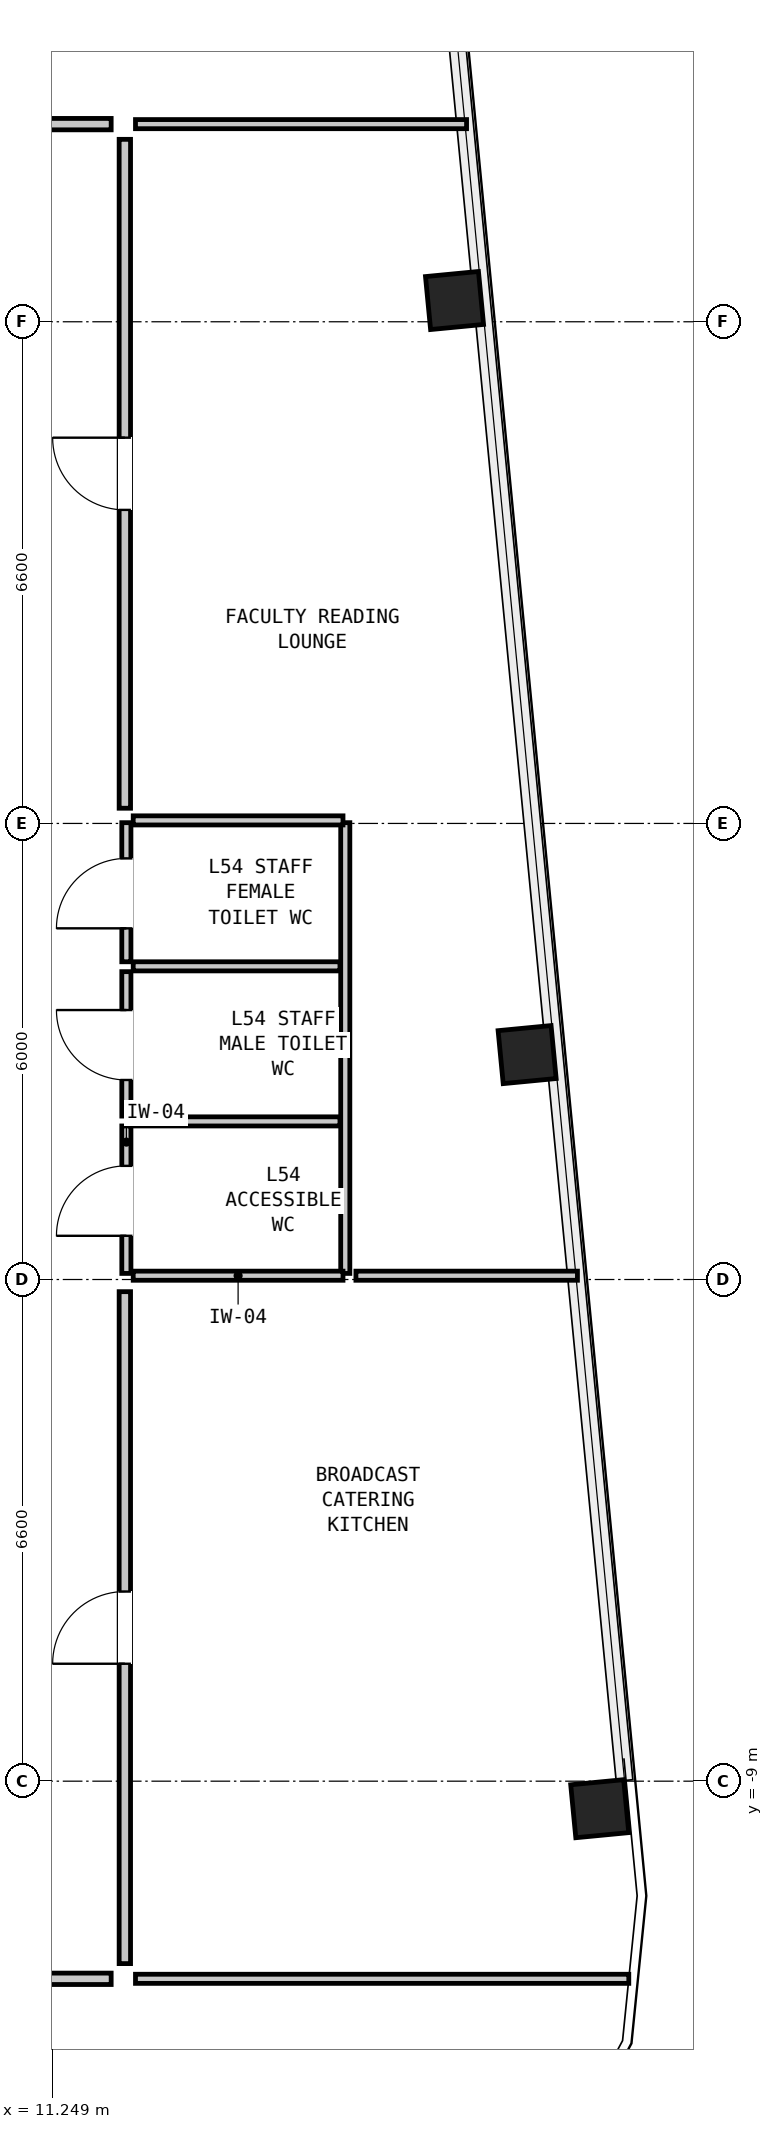
"""IFC4 building model, lengths in metres.
Left out: names, types, materials, properties, quantities, classifications, styles, units other than length and angle.
Written with IfcOpenShell. Run it as: python <this file> out.ifc"""

import sys

from ifc_helpers import new_model, si_unit, direction, frame, frame_2d, origin, origin_2d, place, context, subcontext, project, spatial, rectangle, hollow_rectangle, extrude, element, fill, save


model = new_model("IFC4")
c1 = context("Model", 3, precision=1e-05, world=origin(), true_north=direction((0.0, 1.0)))
c2 = subcontext(c1, "Body", "Model", "MODEL_VIEW")
j1 = project(units=[si_unit("LENGTHUNIT", "METRE"), si_unit("PLANEANGLEUNIT", "RADIAN")], contexts=[c1])
p1 = place(None, origin())
s1 = spatial("IfcSite", under=j1, at=p1, CompositionType="ELEMENT")
p2 = place(p1, origin())
s2 = spatial("IfcBuilding", under=s1, at=p2, CompositionType="ELEMENT")
p3 = place(p2, frame((0.0, 0.0, 183.6)))
s3 = spatial("IfcBuildingStorey", under=s2, at=p3, CompositionType="ELEMENT", Elevation=183.6)
for number, where, z_axis, x_axis in (
    (1, (18.448, -9.362, 0.0), (0.0, 0.0, 1.0), (-0.096, 0.995, 0.0)),
    (2, (17.493, 0.559, 0.0), (0.0, 0.0, 1.0), (-0.096, 0.995, 0.0)),
    (3, (16.537, 10.479, 0.0), (0.0, 0.0, 1.0), (-0.096, 0.995, 0.0)),
):
    element("IfcColumn", number, at=place(p3, frame(where, z_axis=z_axis, x_axis=x_axis)), inside=s3, PredefinedType="COLUMN", context=c2, shape_type="SweptSolid", body=[
        extrude(hollow_rectangle(XDim=0.7, YDim=0.7, WallThickness=0.045, at=origin_2d()), origin(), (0.0, 0.0, 1.0), 4.35),
    ])
p4 = place(p3, frame((12.22, -2.32, 0.0), z_axis=(0.0, 0.0, 1.0), x_axis=(0.0, 1.0, 0.0)))
e4 = element("IfcWall", 4, at=p4, inside=s3, PredefinedType="PARTITIONING", context=c2, shape_type="SweptSolid", body=[
    extrude(rectangle(XDim=1.94, YDim=0.12, at=frame_2d((0.97, 0.0))), origin(), (0.0, 0.0, 1.0), 4.07),
])
p5 = place(p4, frame((0.495, 0.0, 0.0)))
e5 = element("IfcOpeningElement", 5, at=p5, cuts=e4, PredefinedType="OPENING", context=c2, shape_type="SweptSolid", body=[
    extrude(rectangle(XDim=0.92, YDim=2.1, at=frame_2d((0.46, 1.05))), frame((0.0, 0.072, 0.0), z_axis=(0.0, -1.0, 0.0), x_axis=(1.0, 0.0, 0.0)), (0.0, 0.0, 1.0), 0.144),
])
p6 = place(p3, frame((12.22, -0.25, 0.0), z_axis=(0.0, 0.0, 1.0), x_axis=(0.0, 1.0, 0.0)))
e6 = element("IfcWall", 6, at=p6, inside=s3, PredefinedType="PARTITIONING", context=c2, shape_type="SweptSolid", body=[
    extrude(rectangle(XDim=1.9, YDim=0.12, at=frame_2d((0.95, 0.0))), origin(), (0.0, 0.0, 1.0), 4.07),
])
p7 = place(p6, frame((0.475, 0.0, 0.0)))
e7 = element("IfcOpeningElement", 7, at=p7, cuts=e6, PredefinedType="OPENING", context=c2, shape_type="SweptSolid", body=[
    extrude(rectangle(XDim=0.92, YDim=2.1, at=frame_2d((0.46, 1.05))), frame((0.0, 0.072, 0.0), z_axis=(0.0, -1.0, 0.0), x_axis=(1.0, 0.0, 0.0)), (0.0, 0.0, 1.0), 0.144),
])
p8 = place(p3, frame((12.22, 1.78, 0.0), z_axis=(0.0, 0.0, 1.0), x_axis=(0.0, 1.0, 0.0)))
e8 = element("IfcWall", 8, at=p8, inside=s3, PredefinedType="PARTITIONING", context=c2, shape_type="SweptSolid", body=[
    extrude(rectangle(XDim=1.83, YDim=0.12, at=frame_2d((0.915, 0.0))), origin(), (0.0, 0.0, 1.0), 4.07),
])
p9 = place(p8, frame((0.44, 0.0, 0.0)))
e9 = element("IfcOpeningElement", 9, at=p9, cuts=e8, PredefinedType="OPENING", context=c2, shape_type="SweptSolid", body=[
    extrude(rectangle(XDim=0.92, YDim=2.1, at=frame_2d((0.46, 1.05))), frame((0.0, 0.072, 0.0), z_axis=(0.0, -1.0, 0.0), x_axis=(1.0, 0.0, 0.0)), (0.0, 0.0, 1.0), 0.144),
])
p10 = place(p3, frame((15.1, -2.32, 0.0), z_axis=(0.0, 0.0, 1.0), x_axis=(0.0, 1.0, 0.0)))
e10 = element("IfcWall", 10, at=p10, inside=s3, PredefinedType="PARTITIONING", context=c2, shape_type="SweptSolid", body=[
    extrude(rectangle(XDim=5.93, YDim=0.12, at=frame_2d((2.965, 0.0))), origin(), (0.0, 0.0, 1.0), 4.07),
])
for number, where, z_axis, x_axis in (
    (11, (12.31, -2.35, 0.0), (0.0, 0.0, 1.0), (1.0, 0.0, 0.0)),
    (12, (12.31, 3.64, 0.0), (0.0, 0.0, 1.0), (1.0, 0.0, 0.0)),
):
    element("IfcWall", number, at=place(p3, frame(where, z_axis=z_axis, x_axis=x_axis)), inside=s3, PredefinedType="PARTITIONING", context=c2, shape_type="SweptSolid", body=[
        extrude(rectangle(XDim=2.76, YDim=0.12, at=frame_2d((1.38, 0.0))), origin(), (0.0, 0.0, 1.0), 2.25),
    ])
for number, where, z_axis, x_axis in (
    (13, (12.31, -0.32, 0.0), (0.0, 0.0, 1.0), (1.0, 0.0, 0.0)),
    (14, (12.31, 1.72, 0.0), (0.0, 0.0, 1.0), (1.0, 0.0, 0.0)),
):
    element("IfcWall", number, at=place(p3, frame(where, z_axis=z_axis, x_axis=x_axis)), inside=s3, PredefinedType="PARTITIONING", context=c2, shape_type="SweptSolid", body=[
        extrude(rectangle(XDim=2.72, YDim=0.12, at=frame_2d((1.36, 0.0))), origin(), (0.0, 0.0, 1.0), 4.07),
    ])
p11 = place(p3, frame((12.34, 12.8, 0.0), z_axis=(0.0, 0.0, 1.0), x_axis=(1.0, 0.0, 0.0)))
e15 = element("IfcWall", 15, at=p11, inside=s3, PredefinedType="PARTITIONING", context=c2, shape_type="SweptSolid", body=[
    extrude(rectangle(XDim=4.355, YDim=0.12, at=frame_2d((2.178, 0.0))), origin(), (0.0, 0.0, 1.0), 2.25),
])
p12 = place(p3, frame((12.34, -11.6, 0.0), z_axis=(0.0, 0.0, 1.0), x_axis=(1.0, 0.0, 0.0)))
e16 = element("IfcWall", 16, at=p12, inside=s3, PredefinedType="PARTITIONING", context=c2, shape_type="SweptSolid", body=[
    extrude(rectangle(XDim=6.49, YDim=0.12, at=frame_2d((3.245, 0.0))), origin(), (0.0, 0.0, 1.0), 4.07),
])
p13 = place(p3, frame((15.24, -2.35, 0.0), z_axis=(0.0, 0.0, 1.0), x_axis=(1.0, 0.0, 0.0)))
e17 = element("IfcWall", 17, at=p13, inside=s3, PredefinedType="PARTITIONING", context=c2, shape_type="SweptSolid", body=[
    extrude(rectangle(XDim=2.914, YDim=0.12, at=frame_2d((1.457, 0.0))), origin(), (0.0, 0.0, 1.0), 2.25),
])
p14 = place(p3, frame((5.58, 12.8, 0.0), z_axis=(0.0, 0.0, 1.0), x_axis=(1.0, 0.0, 0.0)))
e18 = element("IfcWall", 18, at=p14, inside=s3, PredefinedType="PARTITIONING", context=c2, shape_type="SweptSolid", body=[
    extrude(rectangle(XDim=6.44, YDim=0.15, at=frame_2d((3.22, 0.0))), origin(), (0.0, 0.0, 1.0), 2.25),
])
p15 = place(p14, frame((2.62, 0.0, 0.0)))
e19 = element("IfcOpeningElement", 19, at=p15, cuts=e18, PredefinedType="OPENING", context=c2, shape_type="SweptSolid", body=[
    extrude(rectangle(XDim=1.2, YDim=2.1, at=frame_2d((0.6, 1.05))), frame((0.0, 0.087, 0.0), z_axis=(0.0, -1.0, 0.0), x_axis=(1.0, 0.0, 0.0)), (0.0, 0.0, 1.0), 0.174),
])
p16 = place(p3, frame((0.18, -11.6, 0.0), z_axis=(0.0, 0.0, 1.0), x_axis=(1.0, 0.0, 0.0)))
e20 = element("IfcWall", 20, at=p16, inside=s3, PredefinedType="PARTITIONING", context=c2, shape_type="SweptSolid", body=[
    extrude(rectangle(XDim=11.84, YDim=0.15, at=frame_2d((5.92, 0.0))), origin(), (0.0, 0.0, 1.0), 3.288),
])
p17 = place(p16, frame((5.32, 0.0, 0.0)))
e21 = element("IfcOpeningElement", 21, at=p17, cuts=e20, PredefinedType="OPENING", context=c2, shape_type="SweptSolid", body=[
    extrude(rectangle(XDim=1.2, YDim=2.1, at=frame_2d((0.6, 1.05))), frame((0.0, 0.087, 0.0), z_axis=(0.0, -1.0, 0.0), x_axis=(1.0, 0.0, 0.0)), (0.0, 0.0, 1.0), 0.174),
])
p18 = place(p3, frame((12.2, -11.4, 0.0), z_axis=(0.0, 0.0, 1.0), x_axis=(0.0, 1.0, 0.0)))
e22 = element("IfcWall", 22, at=p18, inside=s3, PredefinedType="PARTITIONING", context=c2, shape_type="SweptSolid", body=[
    extrude(rectangle(XDim=8.84, YDim=0.15, at=frame_2d((4.42, 0.0))), origin(), (0.0, 0.0, 1.0), 4.07),
])
p19 = place(p18, frame((3.945, 0.0, 0.0)))
e23 = element("IfcOpeningElement", 23, at=p19, cuts=e22, PredefinedType="OPENING", context=c2, shape_type="SweptSolid", body=[
    extrude(rectangle(XDim=0.95, YDim=2.1, at=frame_2d((0.475, 1.05))), frame((0.0, 0.087, 0.0), z_axis=(0.0, -1.0, 0.0), x_axis=(1.0, 0.0, 0.0)), (0.0, 0.0, 1.0), 0.174),
])
p20 = place(p3, frame((12.2, 3.8, 0.0), z_axis=(0.0, 0.0, 1.0), x_axis=(0.0, 1.0, 0.0)))
e24 = element("IfcWall", 24, at=p20, inside=s3, PredefinedType="PARTITIONING", context=c2, shape_type="SweptSolid", body=[
    extrude(rectangle(XDim=8.8, YDim=0.15, at=frame_2d((4.4, 0.0))), origin(), (0.0, 0.0, 1.0), 4.07),
])
p21 = place(p20, frame((3.925, 0.0, 0.0)))
e25 = element("IfcOpeningElement", 25, at=p21, cuts=e24, PredefinedType="OPENING", context=c2, shape_type="SweptSolid", body=[
    extrude(rectangle(XDim=0.95, YDim=2.1, at=frame_2d((0.475, 1.05))), frame((0.0, 0.087, 0.0), z_axis=(0.0, -1.0, 0.0), x_axis=(1.0, 0.0, 0.0)), (0.0, 0.0, 1.0), 0.174),
])
p22 = place(p5, origin())
e26 = element("IfcDoor", 26, at=p22, inside=s3, OperationType="SINGLE_SWING_LEFT", PredefinedType="DOOR", context=c2, shape_type="SweptSolid", body=[
    extrude(rectangle(XDim=0.92, YDim=2.1, at=frame_2d((0.46, 1.05))), frame((0.0, 0.025, 0.0), z_axis=(0.0, -1.0, 0.0), x_axis=(1.0, 0.0, 0.0)), (0.0, 0.0, 1.0), 0.05),
])
fill(e5, e26)
p23 = place(p7, origin())
e27 = element("IfcDoor", 27, at=p23, inside=s3, OperationType="SINGLE_SWING_RIGHT", PredefinedType="DOOR", context=c2, shape_type="SweptSolid", body=[
    extrude(rectangle(XDim=0.92, YDim=2.1, at=frame_2d((0.46, 1.05))), frame((0.0, 0.025, 0.0), z_axis=(0.0, -1.0, 0.0), x_axis=(1.0, 0.0, 0.0)), (0.0, 0.0, 1.0), 0.05),
])
fill(e7, e27)
p24 = place(p9, origin())
e28 = element("IfcDoor", 28, at=p24, inside=s3, OperationType="SINGLE_SWING_LEFT", PredefinedType="DOOR", context=c2, shape_type="SweptSolid", body=[
    extrude(rectangle(XDim=0.92, YDim=2.1, at=frame_2d((0.46, 1.05))), frame((0.0, 0.025, 0.0), z_axis=(0.0, -1.0, 0.0), x_axis=(1.0, 0.0, 0.0)), (0.0, 0.0, 1.0), 0.05),
])
fill(e9, e28)
p25 = place(p19, origin())
e29 = element("IfcDoor", 29, at=p25, inside=s3, OperationType="SINGLE_SWING_LEFT", PredefinedType="DOOR", context=c2, shape_type="SweptSolid", body=[
    extrude(rectangle(XDim=0.95, YDim=2.1, at=frame_2d((0.475, 1.05))), frame((0.0, 0.025, 0.0), z_axis=(0.0, -1.0, 0.0), x_axis=(1.0, 0.0, 0.0)), (0.0, 0.0, 1.0), 0.05),
])
fill(e23, e29)
p26 = place(p21, origin())
e30 = element("IfcDoor", 30, at=p26, inside=s3, OperationType="SINGLE_SWING_RIGHT", PredefinedType="DOOR", context=c2, shape_type="SweptSolid", body=[
    extrude(rectangle(XDim=0.95, YDim=2.1, at=frame_2d((0.475, 1.05))), frame((0.0, 0.025, 0.0), z_axis=(0.0, -1.0, 0.0), x_axis=(1.0, 0.0, 0.0)), (0.0, 0.0, 1.0), 0.05),
])
fill(e25, e30)
save(model, sys.argv[1])
